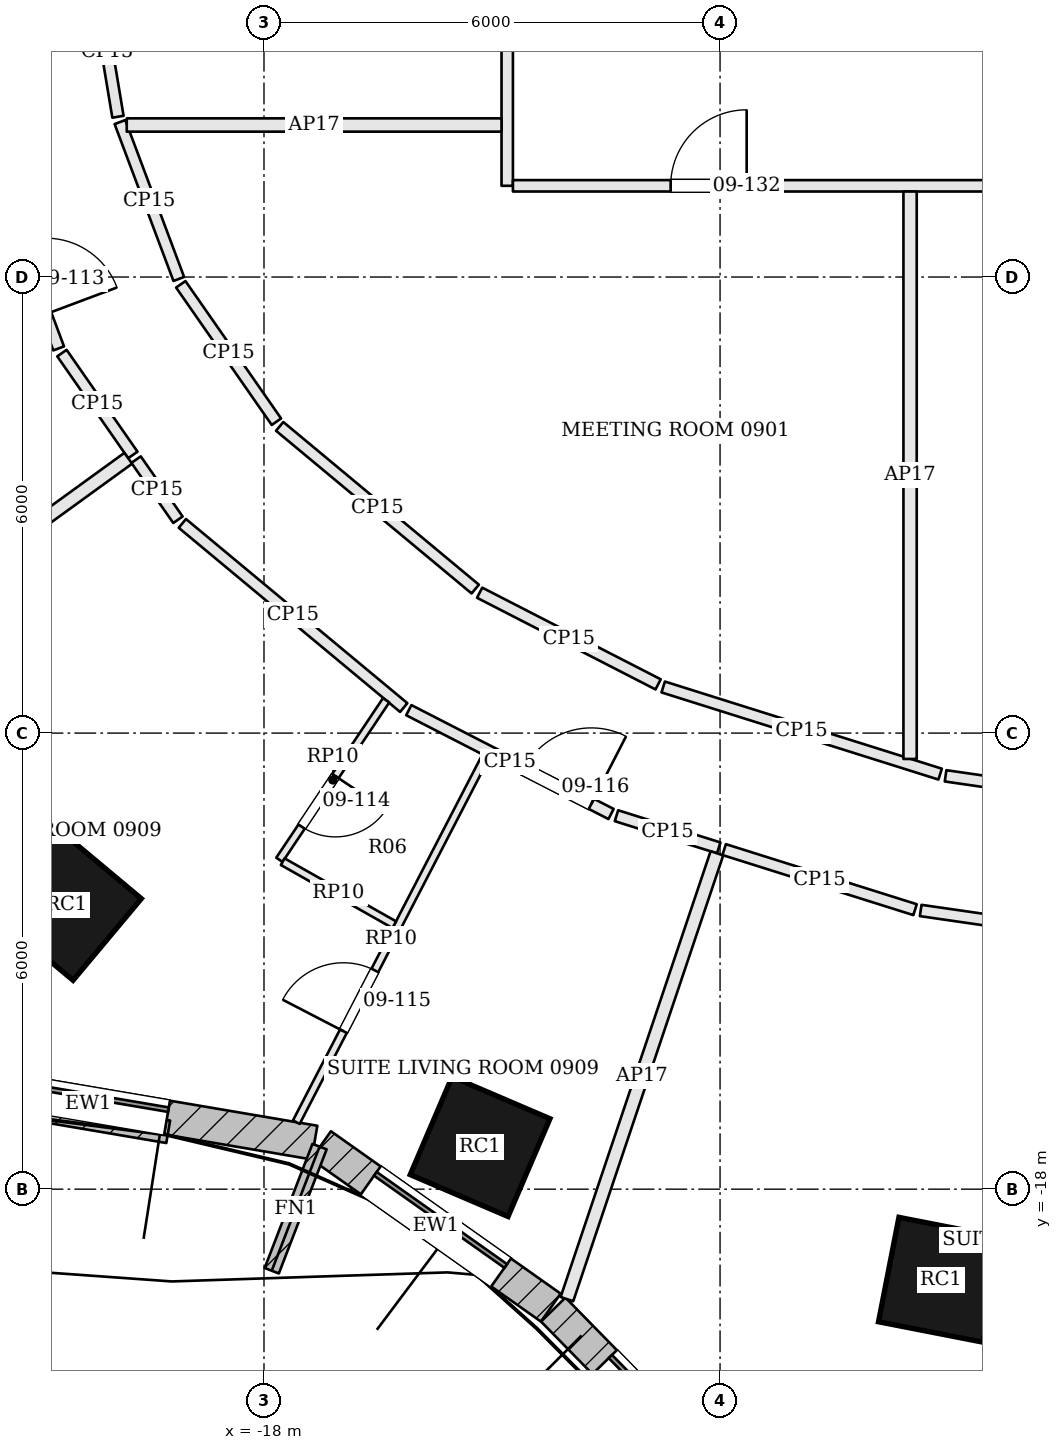
"""IFC4 building model, lengths in metres.
Left out: names, types, materials, properties, quantities, classifications, styles, units other than length and angle.
Written with IfcOpenShell. Run it as: python <this file> out.ifc"""

import sys

from ifc_helpers import new_model, si_unit, direction, frame, frame_2d, origin, origin_2d, place, context, subcontext, project, spatial, rectangle, extrude, element, fill, save


model = new_model("IFC4")
c1 = context("Model", 3, precision=1e-05, world=origin(), true_north=direction((0.0, 1.0)))
c2 = subcontext(c1, "Body", "Model", "MODEL_VIEW")
j1 = project(units=[si_unit("LENGTHUNIT", "METRE"), si_unit("PLANEANGLEUNIT", "RADIAN")], contexts=[c1])
p1 = place(None, origin())
s1 = spatial("IfcSite", under=j1, at=p1, CompositionType="ELEMENT")
p2 = place(p1, origin())
s2 = spatial("IfcBuilding", under=s1, at=p2, CompositionType="ELEMENT")
p3 = place(p2, frame((0.0, 0.0, 48.3)))
s3 = spatial("IfcBuildingStorey", under=s2, at=p3, CompositionType="ELEMENT", Elevation=48.3)
for number, where, z_axis, x_axis in (
    (1, (-20.6, -14.266, 0.0), (0.0, 0.0, 1.0), (0.767, -0.641, 0.0)),
    (2, (-15.157, -17.441, 0.0), (0.0, 0.0, 1.0), (0.919, -0.394, 0.0)),
    (3, (-9.094, -19.192, 0.0), (0.0, 0.0, 1.0), (0.981, -0.192, 0.0)),
):
    element("IfcColumn", number, at=place(p3, frame(where, z_axis=z_axis, x_axis=x_axis)), inside=s3, PredefinedType="COLUMN", context=c2, shape_type="SweptSolid", body=[
        extrude(rectangle(XDim=1.4, YDim=1.4, at=origin_2d()), origin(), (0.0, 0.0, 1.0), 3.6),
    ])
p4 = place(p3, frame((-23.284, -16.376, 0.0), z_axis=(0.0, 0.0, 1.0), x_axis=(0.985861729428, -0.167560885797, 0.0)))
e4 = element("IfcWall", 4, at=p4, inside=s3, PredefinedType="SOLIDWALL", context=c2, shape_type="SweptSolid", body=[
    extrude(rectangle(XDim=6.033, YDim=0.45, at=frame_2d((3.017, 0.0))), origin(), (0.0, 0.0, 1.0), 3.4),
])
p5 = place(p4, frame((1.967, 0.0, 0.9)))
e5 = element("IfcOpeningElement", 5, at=p5, cuts=e4, PredefinedType="OPENING", context=c2, shape_type="SweptSolid", body=[
    extrude(rectangle(XDim=2.1, YDim=2.0, at=frame_2d((1.05, 1.0))), frame((0.0, 0.235, 0.0), z_axis=(0.0, -1.0, 0.0), x_axis=(1.0, 0.0, 0.0)), (0.0, 0.0, 1.0), 0.47),
])
p6 = place(p3, frame((-17.249, -17.422, 0.0), z_axis=(0.0, 0.0, 1.0), x_axis=(0.816589291225, -0.577219134694, 0.0)))
e6 = element("IfcWall", 6, at=p6, inside=s3, PredefinedType="SOLIDWALL", context=c2, shape_type="SweptSolid", body=[
    extrude(rectangle(XDim=3.701, YDim=0.45, at=frame_2d((1.851, 0.0))), origin(), (0.0, 0.0, 1.0), 3.4),
])
p7 = place(p6, frame((0.801, 0.0, 0.9)))
e7 = element("IfcOpeningElement", 7, at=p7, cuts=e6, PredefinedType="OPENING", context=c2, shape_type="SweptSolid", body=[
    extrude(rectangle(XDim=2.1, YDim=2.0, at=frame_2d((1.05, 1.0))), frame((0.0, 0.235, 0.0), z_axis=(0.0, -1.0, 0.0), x_axis=(1.0, 0.0, 0.0)), (0.0, 0.0, 1.0), 0.47),
])
p8 = place(p3, frame((-14.195, -19.584, 0.0), z_axis=(0.0, 0.0, 1.0), x_axis=(0.69962350521, -0.714511687068, 0.0)))
e8 = element("IfcWall", 8, at=p8, inside=s3, PredefinedType="SOLIDWALL", context=c2, shape_type="SweptSolid", body=[
    extrude(rectangle(XDim=4.034, YDim=0.45, at=frame_2d((2.017, 0.0))), origin(), (0.0, 0.0, 1.0), 3.4),
])
p9 = place(p8, frame((0.967, 0.0, 0.9)))
e9 = element("IfcOpeningElement", 9, at=p9, cuts=e8, PredefinedType="OPENING", context=c2, shape_type="SweptSolid", body=[
    extrude(rectangle(XDim=2.1, YDim=2.0, at=frame_2d((1.05, 1.0))), frame((0.0, 0.235, 0.0), z_axis=(0.0, -1.0, 0.0), x_axis=(1.0, 0.0, 0.0)), (0.0, 0.0, 1.0), 0.47),
])
p10 = place(p3, frame((-17.269, -17.44, 0.0), z_axis=(0.0, 0.0, 1.0), x_axis=(-0.359381039836, -0.933190906624, 0.0)))
e10 = element("IfcWall", 10, at=p10, inside=s3, PredefinedType="SOLIDWALL", context=c2, shape_type="SweptSolid", body=[
    extrude(rectangle(XDim=1.75, YDim=0.2, at=frame_2d((0.875, 0.0))), origin(), (0.0, 0.0, 1.0), 3.4),
])
p11 = place(p3, frame((-22.949, -16.618, 3.6), z_axis=(0.0, 0.0, 1.0), x_axis=(0.985859727788, -0.167572662229, 0.0)))
e11 = element("IfcWall", 11, at=p11, inside=s3, PredefinedType="PARAPET", context=c2, shape_type="SweptSolid", body=[
    extrude(rectangle(XDim=3.741, YDim=0.3, at=frame_2d((1.871, 0.0))), origin(), (0.0, 0.0, 1.0), 1.1),
])
p12 = place(p3, frame((-21.642, -4.429, 0.0), z_axis=(0.0, 0.0, 1.0), x_axis=(0.350963719781, -0.936389057709, 0.0)))
e12 = element("IfcWall", 12, at=p12, inside=s3, PredefinedType="PARTITIONING", context=c2, shape_type="SweptSolid", body=[
    extrude(rectangle(XDim=2.68, YDim=0.15, at=frame_2d((1.34, 0.0))), origin(), (0.0, 0.0, 1.0), 2.68),
])
p13 = place(p12, frame((1.199, 0.0, 0.0)))
e13 = element("IfcOpeningElement", 13, at=p13, cuts=e12, PredefinedType="OPENING", context=c2, shape_type="SweptSolid", body=[
    extrude(rectangle(XDim=1.0, YDim=2.1, at=frame_2d((0.5, 1.05))), frame((0.0, 0.085, 0.0), z_axis=(0.0, -1.0, 0.0), x_axis=(1.0, 0.0, 0.0)), (0.0, 0.0, 1.0), 0.17),
])
p14 = place(p3, frame((-20.658, -7.0, 0.0), z_axis=(0.0, 0.0, 1.0), x_axis=(0.571252828516, -0.820774150368, 0.0)))
e14 = element("IfcWall", 14, at=p14, inside=s3, PredefinedType="PARTITIONING", context=c2, shape_type="SweptSolid", body=[
    extrude(rectangle(XDim=1.633, YDim=0.15, at=frame_2d((0.816, 0.0))), origin(), (0.0, 0.0, 1.0), 2.68),
])
p15 = place(p3, frame((-27.245, -13.794, 0.0), z_axis=(0.0, 0.0, 1.0), x_axis=(0.809549997568, 0.587050935982, 0.0)))
e15 = element("IfcWall", 15, at=p15, inside=s3, PredefinedType="PARTITIONING", context=c2, shape_type="SweptSolid", body=[
    extrude(rectangle(XDim=9.214, YDim=0.175, at=frame_2d((4.607, 0.0))), origin(), (0.0, 0.0, 1.0), 2.68),
])
p16 = place(p3, frame((-19.683, -8.402, 0.0), z_axis=(0.0, 0.0, 1.0), x_axis=(0.571250030839, -0.820776097524, 0.0)))
e16 = element("IfcWall", 16, at=p16, inside=s3, PredefinedType="PARTITIONING", context=c2, shape_type="SweptSolid", body=[
    extrude(rectangle(XDim=0.964, YDim=0.15, at=frame_2d((0.482, 0.0))), origin(), (0.0, 0.0, 1.0), 2.68),
])
p17 = place(p3, frame((-19.074, -9.241, 0.0), z_axis=(0.0, 0.0, 1.0), x_axis=(0.768812565259, -0.639474189863, 0.0)))
e17 = element("IfcWall", 17, at=p17, inside=s3, PredefinedType="PARTITIONING", context=c2, shape_type="SweptSolid", body=[
    extrude(rectangle(XDim=3.788, YDim=0.15, at=frame_2d((1.894, 0.0))), origin(), (0.0, 0.0, 1.0), 2.68),
])
p18 = place(p3, frame((-16.095, -11.698, 0.0), z_axis=(0.0, 0.0, 1.0), x_axis=(0.88955984693, -0.456818649717, 0.0)))
e18 = element("IfcWall", 18, at=p18, inside=s3, PredefinedType="PARTITIONING", context=c2, shape_type="SweptSolid", body=[
    extrude(rectangle(XDim=2.991, YDim=0.15, at=frame_2d((1.496, 0.0))), origin(), (0.0, 0.0, 1.0), 2.68),
])
p19 = place(p18, frame((1.7, 0.0, 0.0)))
e19 = element("IfcOpeningElement", 19, at=p19, cuts=e18, PredefinedType="OPENING", context=c2, shape_type="SweptSolid", body=[
    extrude(rectangle(XDim=1.0, YDim=2.1, at=frame_2d((0.5, 1.05))), frame((0.0, 0.085, 0.0), z_axis=(0.0, -1.0, 0.0), x_axis=(1.0, 0.0, 0.0)), (0.0, 0.0, 1.0), 0.17),
])
p20 = place(p3, frame((-13.363, -13.087, 0.0), z_axis=(0.0, 0.0, 1.0), x_axis=(0.95389606241, -0.300137138853, 0.0)))
e20 = element("IfcWall", 20, at=p20, inside=s3, PredefinedType="PARTITIONING", context=c2, shape_type="SweptSolid", body=[
    extrude(rectangle(XDim=1.41, YDim=0.15, at=frame_2d((0.705, 0.0))), origin(), (0.0, 0.0, 1.0), 2.68),
])
p21 = place(p3, frame((-14.014, -19.447, 0.0), z_axis=(0.0, 0.0, 1.0), x_axis=(0.31884215866, 0.947807827495, 0.0)))
e21 = element("IfcWall", 21, at=p21, inside=s3, PredefinedType="PARTITIONING", context=c2, shape_type="SweptSolid", body=[
    extrude(rectangle(XDim=6.188, YDim=0.175, at=frame_2d((3.094, 0.0))), origin(), (0.0, 0.0, 1.0), 2.68),
])
p22 = place(p3, frame((-11.946, -13.533, 0.0), z_axis=(0.0, 0.0, 1.0), x_axis=(0.95388072649, -0.300185875136, 0.0)))
e22 = element("IfcWall", 22, at=p22, inside=s3, PredefinedType="PARTITIONING", context=c2, shape_type="SweptSolid", body=[
    extrude(rectangle(XDim=2.633, YDim=0.15, at=frame_2d((1.316, 0.0))), origin(), (0.0, 0.0, 1.0), 2.68),
])
p23 = place(p3, frame((-9.36, -14.333, 0.0), z_axis=(0.0, 0.0, 1.0), x_axis=(0.989708543436, -0.143097865286, 0.0)))
e23 = element("IfcWall", 23, at=p23, inside=s3, PredefinedType="PARTITIONING", context=c2, shape_type="SweptSolid", body=[
    extrude(rectangle(XDim=5.117, YDim=0.15, at=frame_2d((2.558, 0.0))), origin(), (0.0, 0.0, 1.0), 2.68),
])
p24 = place(p3, frame((-19.921, -3.891, 0.0), z_axis=(0.0, 0.0, 1.0), x_axis=(-0.164100753818, 0.986443583078, 0.0)))
e24 = element("IfcWall", 24, at=p24, inside=s3, PredefinedType="PARTITIONING", context=c2, shape_type="SweptSolid", body=[
    extrude(rectangle(XDim=1.726, YDim=0.15, at=frame_2d((0.863, 0.0))), origin(), (0.0, 0.0, 1.0), 2.68),
])
p25 = place(p3, frame((-14.8, 10.208, 0.0), z_axis=(0.0, 0.0, 1.0), x_axis=(0.0, -1.0, 0.0)))
e25 = element("IfcWall", 25, at=p25, inside=s3, PredefinedType="PARTITIONING", context=c2, shape_type="SweptSolid", body=[
    extrude(rectangle(XDim=15.008, YDim=0.15, at=frame_2d((7.504, 0.0))), origin(), (0.0, 0.0, 1.0), 2.68),
])
p26 = place(p25, frame((2.717, 0.0, 0.0)))
e26 = element("IfcOpeningElement", 26, at=p26, cuts=e25, PredefinedType="OPENING", context=c2, shape_type="SweptSolid", body=[
    extrude(rectangle(XDim=0.7, YDim=2.1, at=frame_2d((0.35, 1.05))), frame((0.0, 0.085, 0.0), z_axis=(0.0, -1.0, 0.0), x_axis=(1.0, 0.0, 0.0)), (0.0, 0.0, 1.0), 0.17),
])
p27 = place(p25, frame((9.708, 0.0, 0.0)))
e27 = element("IfcOpeningElement", 27, at=p27, cuts=e25, PredefinedType="OPENING", context=c2, shape_type="SweptSolid", body=[
    extrude(rectangle(XDim=1.0, YDim=2.1, at=frame_2d((0.5, 1.05))), frame((0.0, 0.085, 0.0), z_axis=(0.0, -1.0, 0.0), x_axis=(1.0, 0.0, 0.0)), (0.0, 0.0, 1.0), 0.17),
])
p28 = place(p3, frame((-14.725, -4.8, 0.0), z_axis=(0.0, 0.0, 1.0), x_axis=(1.0, 0.0, 0.0)))
e28 = element("IfcWall", 28, at=p28, inside=s3, PredefinedType="PARTITIONING", context=c2, shape_type="SweptSolid", body=[
    extrude(rectangle(XDim=29.525, YDim=0.15, at=frame_2d((14.763, 0.0))), origin(), (0.0, 0.0, 1.0), 2.68),
])
p29 = place(p28, frame((2.075, 0.0, 0.0)))
e29 = element("IfcOpeningElement", 29, at=p29, cuts=e28, PredefinedType="OPENING", context=c2, shape_type="SweptSolid", body=[
    extrude(rectangle(XDim=1.0, YDim=2.4, at=frame_2d((0.5, 1.2))), frame((0.0, 0.085, 0.0), z_axis=(0.0, -1.0, 0.0), x_axis=(1.0, 0.0, 0.0)), (0.0, 0.0, 1.0), 0.17),
])
p30 = place(p28, frame((13.825, 0.0, 0.0)))
e30 = element("IfcOpeningElement", 30, at=p30, cuts=e28, PredefinedType="OPENING", context=c2, shape_type="SweptSolid", body=[
    extrude(rectangle(XDim=1.8, YDim=2.1, at=frame_2d((0.9, 1.05))), frame((0.0, 0.085, 0.0), z_axis=(0.0, -1.0, 0.0), x_axis=(1.0, 0.0, 0.0)), (0.0, 0.0, 1.0), 0.17),
])
p31 = place(p28, frame((26.375, 0.0, 0.0)))
e31 = element("IfcOpeningElement", 31, at=p31, cuts=e28, PredefinedType="OPENING", context=c2, shape_type="SweptSolid", body=[
    extrude(rectangle(XDim=1.0, YDim=2.4, at=frame_2d((0.5, 1.2))), frame((0.0, 0.085, 0.0), z_axis=(0.0, -1.0, 0.0), x_axis=(1.0, 0.0, 0.0)), (0.0, 0.0, 1.0), 0.17),
])
p32 = place(p3, frame((-4.22, -13.258, 0.0), z_axis=(0.0, 0.0, 1.0), x_axis=(-0.98971114365, 0.143079880258, 0.0)))
e32 = element("IfcWall", 32, at=p32, inside=s3, PredefinedType="PARTITIONING", context=c2, shape_type="SweptSolid", body=[
    extrude(rectangle(XDim=4.863, YDim=0.15, at=frame_2d((2.432, 0.0))), origin(), (0.0, 0.0, 1.0), 2.68),
])
p33 = place(p3, frame((-9.104, -12.54, 0.0), z_axis=(0.0, 0.0, 1.0), x_axis=(-0.953891280763, 0.300152335464, 0.0)))
e33 = element("IfcWall", 33, at=p33, inside=s3, PredefinedType="PARTITIONING", context=c2, shape_type="SweptSolid", body=[
    extrude(rectangle(XDim=3.82, YDim=0.15, at=frame_2d((1.91, 0.0))), origin(), (0.0, 0.0, 1.0), 2.68),
])
p34 = place(p3, frame((-12.815, -11.359, 0.0), z_axis=(0.0, 0.0, 1.0), x_axis=(-0.889622877315, 0.456695890236, 0.0)))
e34 = element("IfcWall", 34, at=p34, inside=s3, PredefinedType="PARTITIONING", context=c2, shape_type="SweptSolid", body=[
    extrude(rectangle(XDim=2.64, YDim=0.15, at=frame_2d((1.32, 0.0))), origin(), (0.0, 0.0, 1.0), 2.68),
])
p35 = place(p3, frame((-15.221, -10.105, 0.0), z_axis=(0.0, 0.0, 1.0), x_axis=(-0.768812916989, 0.639473766992, 0.0)))
e35 = element("IfcWall", 35, at=p35, inside=s3, PredefinedType="PARTITIONING", context=c2, shape_type="SweptSolid", body=[
    extrude(rectangle(XDim=3.347, YDim=0.15, at=frame_2d((1.673, 0.0))), origin(), (0.0, 0.0, 1.0), 2.68),
])
p36 = place(p3, frame((-17.836, -7.904, 0.0), z_axis=(0.0, 0.0, 1.0), x_axis=(-0.571317790711, 0.820728933338, 0.0)))
e36 = element("IfcWall", 36, at=p36, inside=s3, PredefinedType="PARTITIONING", context=c2, shape_type="SweptSolid", body=[
    extrude(rectangle(XDim=2.202, YDim=0.15, at=frame_2d((1.101, 0.0))), origin(), (0.0, 0.0, 1.0), 2.68),
])
p37 = place(p3, frame((-19.121, -6.026, 0.0), z_axis=(0.0, 0.0, 1.0), x_axis=(-0.351026357955, 0.936365578191, 0.0)))
e37 = element("IfcWall", 37, at=p37, inside=s3, PredefinedType="PARTITIONING", context=c2, shape_type="SweptSolid", body=[
    extrude(rectangle(XDim=2.205, YDim=0.15, at=frame_2d((1.103, 0.0))), origin(), (0.0, 0.0, 1.0), 2.68),
])
p38 = place(p3, frame((-17.575, -17.118, 0.0), z_axis=(0.0, 0.0, 1.0), x_axis=(0.459775633783, 0.888035115623, 0.0)))
e38 = element("IfcWall", 38, at=p38, inside=s3, PredefinedType="PARTITIONING", context=c2, shape_type="SweptSolid", body=[
    extrude(rectangle(XDim=5.423, YDim=0.1, at=frame_2d((2.711, 0.0))), origin(), (0.0, 0.0, 1.0), 2.934),
])
p39 = place(p38, frame((1.348, 0.0, 0.0)))
e39 = element("IfcOpeningElement", 39, at=p39, cuts=e38, PredefinedType="OPENING", context=c2, shape_type="SweptSolid", body=[
    extrude(rectangle(XDim=0.9, YDim=2.4, at=frame_2d((0.45, 1.2))), frame((0.0, 0.06, 0.0), z_axis=(0.0, -1.0, 0.0), x_axis=(1.0, 0.0, 0.0)), (0.0, 0.0, 1.0), 0.12),
])
p40 = place(p3, frame((-16.393, -11.568, 0.0), z_axis=(0.0, 0.0, 1.0), x_axis=(-0.555949061639, -0.831216362245, 0.0)))
e40 = element("IfcWall", 40, at=p40, inside=s3, PredefinedType="PARTITIONING", context=c2, shape_type="SweptSolid", body=[
    extrude(rectangle(XDim=2.525, YDim=0.1, at=frame_2d((1.263, 0.0))), origin(), (0.0, 0.0, 1.0), 2.934),
])
p41 = place(p40, frame((1.2, 0.0, 0.0)))
e41 = element("IfcOpeningElement", 41, at=p41, cuts=e40, PredefinedType="OPENING", context=c2, shape_type="SweptSolid", body=[
    extrude(rectangle(XDim=0.8, YDim=2.1, at=frame_2d((0.4, 1.05))), frame((0.0, 0.06, 0.0), z_axis=(0.0, -1.0, 0.0), x_axis=(1.0, 0.0, 0.0)), (0.0, 0.0, 1.0), 0.12),
])
p42 = place(p3, frame((-17.754, -13.692, 0.0), z_axis=(0.0, 0.0, 1.0), x_axis=(0.870754296655, -0.491718369452, 0.0)))
e42 = element("IfcWall", 42, at=p42, inside=s3, PredefinedType="PARTITIONING", context=c2, shape_type="SweptSolid", body=[
    extrude(rectangle(XDim=1.686, YDim=0.1, at=frame_2d((0.843, 0.0))), origin(), (0.0, 0.0, 1.0), 2.934),
])
p43 = place(p3, frame((-9.5, -12.34, 0.0), z_axis=(0.0, 0.0, 1.0), x_axis=(0.0, 1.0, 0.0)))
e43 = element("IfcWall", 43, at=p43, inside=s3, PredefinedType="PARTITIONING", context=c2, shape_type="SweptSolid", body=[
    extrude(rectangle(XDim=7.465, YDim=0.175, at=frame_2d((3.733, 0.0))), origin(), (0.0, 0.0, 1.0), 2.68),
])
p44 = place(p3, frame((-19.805, -4.0, 0.0), z_axis=(0.0, 0.0, 1.0), x_axis=(1.0, 0.0, 0.0)))
e44 = element("IfcWall", 44, at=p44, inside=s3, PredefinedType="PARTITIONING", context=c2, shape_type="SweptSolid", body=[
    extrude(rectangle(XDim=4.93, YDim=0.175, at=frame_2d((2.465, 0.0))), origin(), (0.0, 0.0, 1.0), 2.68),
])
p45 = place(p5, origin())
e45 = element("IfcWindow", 45, at=p45, inside=s3, PartitioningType="SINGLE_PANEL", PredefinedType="WINDOW", context=c2, shape_type="SweptSolid", body=[
    extrude(rectangle(XDim=2.1, YDim=2.0, at=frame_2d((1.05, 1.0))), frame((0.0, 0.135, 0.0), z_axis=(0.0, -1.0, 0.0), x_axis=(1.0, 0.0, 0.0)), (0.0, 0.0, 1.0), 0.06),
])
fill(e5, e45)
p46 = place(p7, origin())
e46 = element("IfcWindow", 46, at=p46, inside=s3, PartitioningType="SINGLE_PANEL", PredefinedType="WINDOW", context=c2, shape_type="SweptSolid", body=[
    extrude(rectangle(XDim=2.1, YDim=2.0, at=frame_2d((1.05, 1.0))), frame((0.0, 0.135, 0.0), z_axis=(0.0, -1.0, 0.0), x_axis=(1.0, 0.0, 0.0)), (0.0, 0.0, 1.0), 0.06),
])
fill(e7, e46)
p47 = place(p9, origin())
e47 = element("IfcWindow", 47, at=p47, inside=s3, PartitioningType="SINGLE_PANEL", PredefinedType="WINDOW", context=c2, shape_type="SweptSolid", body=[
    extrude(rectangle(XDim=2.1, YDim=2.0, at=frame_2d((1.05, 1.0))), frame((0.0, 0.135, 0.0), z_axis=(0.0, -1.0, 0.0), x_axis=(1.0, 0.0, 0.0)), (0.0, 0.0, 1.0), 0.06),
])
fill(e9, e47)
p48 = place(p41, origin())
e48 = element("IfcDoor", 48, at=p48, inside=s3, OperationType="SINGLE_SWING_LEFT", PredefinedType="DOOR", context=c2, shape_type="SweptSolid", body=[
    extrude(rectangle(XDim=0.8, YDim=2.1, at=frame_2d((0.4, 1.05))), frame((0.0, 0.025, 0.0), z_axis=(0.0, -1.0, 0.0), x_axis=(1.0, 0.0, 0.0)), (0.0, 0.0, 1.0), 0.05),
])
fill(e41, e48)
p49 = place(p39, origin())
e49 = element("IfcDoor", 49, at=p49, inside=s3, OperationType="SINGLE_SWING_LEFT", PredefinedType="DOOR", context=c2, shape_type="SweptSolid", body=[
    extrude(rectangle(XDim=0.9, YDim=2.4, at=frame_2d((0.45, 1.2))), frame((0.0, 0.025, 0.0), z_axis=(0.0, -1.0, 0.0), x_axis=(1.0, 0.0, 0.0)), (0.0, 0.0, 1.0), 0.05),
])
fill(e39, e49)
p50 = place(p19, origin())
e50 = element("IfcDoor", 50, at=p50, inside=s3, OperationType="SINGLE_SWING_RIGHT", PredefinedType="DOOR", context=c2, shape_type="SweptSolid", body=[
    extrude(rectangle(XDim=1.0, YDim=2.1, at=frame_2d((0.5, 1.05))), frame((0.0, 0.025, 0.0), z_axis=(0.0, -1.0, 0.0), x_axis=(1.0, 0.0, 0.0)), (0.0, 0.0, 1.0), 0.05),
])
fill(e19, e50)
p51 = place(p29, origin())
e51 = element("IfcDoor", 51, at=p51, inside=s3, OperationType="SINGLE_SWING_RIGHT", PredefinedType="DOOR", context=c2, shape_type="SweptSolid", body=[
    extrude(rectangle(XDim=1.0, YDim=2.4, at=frame_2d((0.5, 1.2))), frame((0.0, 0.025, 0.0), z_axis=(0.0, -1.0, 0.0), x_axis=(1.0, 0.0, 0.0)), (0.0, 0.0, 1.0), 0.05),
])
fill(e29, e51)
save(model, sys.argv[1])
